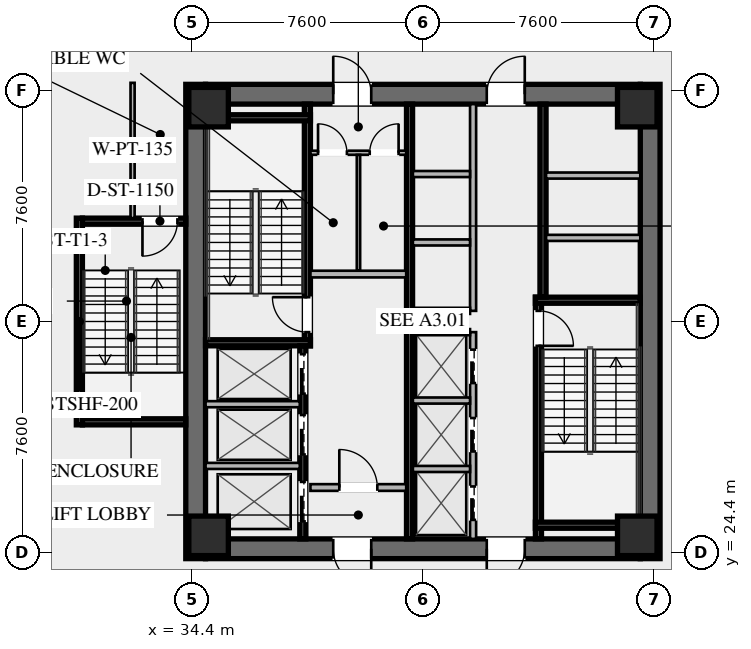
"""IFC4 building model, lengths in metres.
Left out: names, types, materials, properties, quantities, classifications, styles, units other than length and angle.
Written with IfcOpenShell. Run it as: python <this file> out.ifc"""

import sys

from ifc_helpers import new_model, si_unit, direction, frame, frame_2d, origin, origin_2d, place, context, subcontext, project, spatial, rectangle, hollow_rectangle, extrude, element, fill, save


model = new_model("IFC4")
c1 = context("Model", 3, precision=1e-05, world=origin(), true_north=direction((0.0, 1.0)))
c2 = subcontext(c1, "Body", "Model", "MODEL_VIEW")
j1 = project(units=[si_unit("LENGTHUNIT", "METRE"), si_unit("PLANEANGLEUNIT", "RADIAN")], contexts=[c1])
p1 = place(None, origin())
s1 = spatial("IfcSite", under=j1, at=p1, CompositionType="ELEMENT")
p2 = place(p1, origin())
s2 = spatial("IfcBuilding", under=s1, at=p2, CompositionType="ELEMENT")
p3 = place(p2, frame((0.0, 0.0, 5.4)))
s3 = spatial("IfcBuildingStorey", under=s2, at=p3, CompositionType="ELEMENT", Elevation=5.4)
for number, where, z_axis, x_axis in (
    (1, (34.525, 24.2, 0.0), (0.0, 0.0, 1.0), (0.0, 1.0, 0.0)),
    (2, (49.475, 39.8, 0.0), (0.0, 0.0, 1.0), (0.0, -1.0, 0.0)),
):
    element("IfcWall", number, at=place(p3, frame(where, z_axis=z_axis, x_axis=x_axis)), inside=s3, PredefinedType="SHEAR", context=c2, shape_type="SweptSolid", body=[
        extrude(rectangle(XDim=15.6, YDim=0.65, at=frame_2d((7.8, 0.0))), origin(), (0.0, 0.0, 1.0), 4.8),
    ])
p4 = place(p3, frame((49.15, 24.525, 0.0), z_axis=(0.0, 0.0, 1.0), x_axis=(-1.0, 0.0, 0.0)))
e3 = element("IfcWall", 3, at=p4, inside=s3, PredefinedType="SHEAR", context=c2, shape_type="SweptSolid", body=[
    extrude(rectangle(XDim=14.3, YDim=0.65, at=frame_2d((7.15, 0.0))), origin(), (0.0, 0.0, 1.0), 4.8),
])
p5 = place(p4, frame((8.85, 0.0, 0.0)))
e4 = element("IfcOpeningElement", 4, at=p5, cuts=e3, PredefinedType="OPENING", context=c2, shape_type="SweptSolid", body=[
    extrude(rectangle(XDim=1.25, YDim=2.25, at=frame_2d((0.625, 1.125))), frame((0.0, 0.335, 0.0), z_axis=(0.0, -1.0, 0.0), x_axis=(1.0, 0.0, 0.0)), (0.0, 0.0, 1.0), 0.67),
])
p6 = place(p4, frame((3.8, 0.0, 0.0)))
e5 = element("IfcOpeningElement", 5, at=p6, cuts=e3, PredefinedType="OPENING", context=c2, shape_type="SweptSolid", body=[
    extrude(rectangle(XDim=1.25, YDim=2.25, at=frame_2d((0.625, 1.125))), frame((0.0, 0.335, 0.0), z_axis=(0.0, -1.0, 0.0), x_axis=(1.0, 0.0, 0.0)), (0.0, 0.0, 1.0), 0.67),
])
p7 = place(p3, frame((34.85, 39.475, 0.0), z_axis=(0.0, 0.0, 1.0), x_axis=(1.0, 0.0, 0.0)))
e6 = element("IfcWall", 6, at=p7, inside=s3, PredefinedType="SHEAR", context=c2, shape_type="SweptSolid", body=[
    extrude(rectangle(XDim=14.3, YDim=0.65, at=frame_2d((7.15, 0.0))), origin(), (0.0, 0.0, 1.0), 4.8),
])
p8 = place(p7, frame((4.2, 0.0, 0.0)))
e7 = element("IfcOpeningElement", 7, at=p8, cuts=e6, PredefinedType="OPENING", context=c2, shape_type="SweptSolid", body=[
    extrude(rectangle(XDim=1.25, YDim=2.25, at=frame_2d((0.625, 1.125))), frame((0.0, 0.335, 0.0), z_axis=(0.0, -1.0, 0.0), x_axis=(1.0, 0.0, 0.0)), (0.0, 0.0, 1.0), 0.67),
])
p9 = place(p7, frame((9.25, 0.0, 0.0)))
e8 = element("IfcOpeningElement", 8, at=p9, cuts=e6, PredefinedType="OPENING", context=c2, shape_type="SweptSolid", body=[
    extrude(rectangle(XDim=1.25, YDim=2.25, at=frame_2d((0.625, 1.125))), frame((0.0, 0.335, 0.0), z_axis=(0.0, -1.0, 0.0), x_axis=(1.0, 0.0, 0.0)), (0.0, 0.0, 1.0), 0.67),
])
for number, where, z_axis, x_axis in (
    (9, (34.95, 24.95, 0.0), (0.0, 0.0, 1.0), (1.0, 0.0, 0.0)),
    (10, (49.05, 24.95, 0.0), (0.0, 0.0, 1.0), (1.0, 0.0, 0.0)),
    (11, (49.05, 39.05, 0.0), (0.0, 0.0, 1.0), (1.0, 0.0, 0.0)),
    (12, (34.95, 39.05, 0.0), (0.0, 0.0, 1.0), (1.0, 0.0, 0.0)),
):
    element("IfcColumn", number, at=place(p3, frame(where, z_axis=z_axis, x_axis=x_axis)), inside=s3, PredefinedType="COLUMN", context=c2, shape_type="SweptSolid", body=[
        extrude(hollow_rectangle(XDim=1.3, YDim=1.3, WallThickness=0.05, at=origin_2d()), origin(), (0.0, 0.0, 1.0), 4.54),
    ])
p10 = place(p3, frame((38.2, 31.2, 0.0), z_axis=(0.0, 0.0, 1.0), x_axis=(0.0, 1.0, 0.0)))
e13 = element("IfcWall", 13, at=p10, inside=s3, PredefinedType="SHEAR", context=c2, shape_type="SweptSolid", body=[
    extrude(rectangle(XDim=7.95, YDim=0.2, at=frame_2d((3.975, 0.0))), origin(), (0.0, 0.0, 1.0), 4.54),
])
p11 = place(p10, frame((0.45, 0.0, 0.0)))
e14 = element("IfcOpeningElement", 14, at=p11, cuts=e13, PredefinedType="OPENING", context=c2, shape_type="SweptSolid", body=[
    extrude(rectangle(XDim=1.15, YDim=2.2, at=frame_2d((0.575, 1.1))), frame((0.0, 0.11, 0.0), z_axis=(0.0, -1.0, 0.0), x_axis=(1.0, 0.0, 0.0)), (0.0, 0.0, 1.0), 0.22),
])
for number, where, z_axis, x_axis in (
    (15, (34.85, 31.3, 0.0), (0.0, 0.0, 1.0), (1.0, 0.0, 0.0)),
    (16, (34.85, 38.7, 0.0), (0.0, 0.0, 1.0), (1.0, 0.0, 0.0)),
):
    element("IfcWall", number, at=place(p3, frame(where, z_axis=z_axis, x_axis=x_axis)), inside=s3, PredefinedType="SHEAR", context=c2, shape_type="SweptSolid", body=[
        extrude(rectangle(XDim=3.45, YDim=0.2, at=frame_2d((1.725, 0.0))), origin(), (0.0, 0.0, 1.0), 4.54),
    ])
p12 = place(p3, frame((45.8, 32.8, 0.0), z_axis=(0.0, 0.0, 1.0), x_axis=(0.0, -1.0, 0.0)))
e17 = element("IfcWall", 17, at=p12, inside=s3, PredefinedType="SHEAR", context=c2, shape_type="SweptSolid", body=[
    extrude(rectangle(XDim=7.95, YDim=0.2, at=frame_2d((3.975, 0.0))), origin(), (0.0, 0.0, 1.0), 4.54),
])
p13 = place(p12, frame((0.45, 0.0, 0.0)))
e18 = element("IfcOpeningElement", 18, at=p13, cuts=e17, PredefinedType="OPENING", context=c2, shape_type="SweptSolid", body=[
    extrude(rectangle(XDim=1.15, YDim=2.2, at=frame_2d((0.575, 1.1))), frame((0.0, 0.11, 0.0), z_axis=(0.0, -1.0, 0.0), x_axis=(1.0, 0.0, 0.0)), (0.0, 0.0, 1.0), 0.22),
])
for number, where, z_axis, x_axis in (
    (19, (45.7, 32.7, 0.0), (0.0, 0.0, 1.0), (1.0, 0.0, 0.0)),
    (20, (45.7, 25.3, 0.0), (0.0, 0.0, 1.0), (1.0, 0.0, 0.0)),
):
    element("IfcWall", number, at=place(p3, frame(where, z_axis=z_axis, x_axis=x_axis)), inside=s3, PredefinedType="SHEAR", context=c2, shape_type="SweptSolid", body=[
        extrude(rectangle(XDim=3.45, YDim=0.2, at=frame_2d((1.725, 0.0))), origin(), (0.0, 0.0, 1.0), 4.54),
    ])
p14 = place(p3, frame((41.56, 24.85, 0.0), z_axis=(0.0, 0.0, 1.0), x_axis=(0.0, 1.0, 0.0)))
e21 = element("IfcWall", 21, at=p14, inside=s3, PredefinedType="SHEAR", context=c2, shape_type="SweptSolid", body=[
    extrude(rectangle(XDim=14.3, YDim=0.2, at=frame_2d((7.15, 0.0))), origin(), (0.0, 0.0, 1.0), 4.54),
])
p15 = place(p3, frame((38.3, 33.56, 0.0), z_axis=(0.0, 0.0, 1.0), x_axis=(1.0, 0.0, 0.0)))
e22 = element("IfcWall", 22, at=p15, inside=s3, PredefinedType="SOLIDWALL", context=c2, shape_type="SweptSolid", body=[
    extrude(rectangle(XDim=3.15, YDim=0.22, at=frame_2d((1.575, 0.0))), origin(), (0.0, 0.0, 1.0), 3.583),
])
p16 = place(p3, frame((38.3, 26.54, 0.0), z_axis=(0.0, 0.0, 1.0), x_axis=(1.0, 0.0, 0.0)))
e23 = element("IfcWall", 23, at=p16, inside=s3, PredefinedType="SOLIDWALL", context=c2, shape_type="SweptSolid", body=[
    extrude(rectangle(XDim=3.15, YDim=0.22, at=frame_2d((1.575, 0.0))), origin(), (0.0, 0.0, 1.0), 3.583),
])
p17 = place(p16, frame((0.95, 0.0, 0.0)))
e24 = element("IfcOpeningElement", 24, at=p17, cuts=e23, PredefinedType="OPENING", context=c2, shape_type="SweptSolid", body=[
    extrude(rectangle(XDim=1.25, YDim=2.25, at=frame_2d((0.625, 1.125))), frame((0.0, 0.12, 0.0), z_axis=(0.0, -1.0, 0.0), x_axis=(1.0, 0.0, 0.0)), (0.0, 0.0, 1.0), 0.24),
])
p18 = place(p3, frame((38.05, 24.85, 0.0), z_axis=(0.0, 0.0, 1.0), x_axis=(0.0, 1.0, 0.0)))
e25 = element("IfcWall", 25, at=p18, inside=s3, PredefinedType="SHEAR", context=c2, shape_type="SweptSolid", body=[
    extrude(rectangle(XDim=6.35, YDim=0.2, at=frame_2d((3.175, 0.0))), origin(), (0.0, 0.0, 1.0), 4.54),
])
p19 = place(p18, frame((4.775, 0.0, 0.0)))
e26 = element("IfcOpeningElement", 26, at=p19, cuts=e25, PredefinedType="OPENING", context=c2, shape_type="SweptSolid", body=[
    extrude(rectangle(XDim=1.3, YDim=2.25, at=frame_2d((0.65, 1.125))), frame((0.0, 0.11, 0.0), z_axis=(0.0, -1.0, 0.0), x_axis=(1.0, 0.0, 0.0)), (0.0, 0.0, 1.0), 0.22),
])
p20 = place(p18, frame((2.775, 0.0, 0.0)))
e27 = element("IfcOpeningElement", 27, at=p20, cuts=e25, PredefinedType="OPENING", context=c2, shape_type="SweptSolid", body=[
    extrude(rectangle(XDim=1.3, YDim=2.25, at=frame_2d((0.65, 1.125))), frame((0.0, 0.11, 0.0), z_axis=(0.0, -1.0, 0.0), x_axis=(1.0, 0.0, 0.0)), (0.0, 0.0, 1.0), 0.22),
])
p21 = place(p18, frame((0.575, 0.0, 0.0)))
e28 = element("IfcOpeningElement", 28, at=p21, cuts=e25, PredefinedType="OPENING", context=c2, shape_type="SweptSolid", body=[
    extrude(rectangle(XDim=1.3, YDim=2.25, at=frame_2d((0.65, 1.125))), frame((0.0, 0.11, 0.0), z_axis=(0.0, -1.0, 0.0), x_axis=(1.0, 0.0, 0.0)), (0.0, 0.0, 1.0), 0.22),
])
for number, where, z_axis, x_axis in (
    (29, (34.85, 27.25, 0.0), (0.0, 0.0, 1.0), (1.0, 0.0, 0.0)),
    (30, (34.85, 29.28, 0.0), (0.0, 0.0, 1.0), (1.0, 0.0, 0.0)),
):
    element("IfcWall", number, at=place(p3, frame(where, z_axis=z_axis, x_axis=x_axis)), inside=s3, PredefinedType="SOLIDWALL", context=c2, shape_type="SweptSolid", body=[
        extrude(rectangle(XDim=3.1, YDim=0.2, at=frame_2d((1.55, 0.0))), origin(), (0.0, 0.0, 1.0), 4.54),
    ])
p22 = place(p3, frame((45.95, 39.15, 0.0), z_axis=(0.0, 0.0, 1.0), x_axis=(0.0, -1.0, 0.0)))
e31 = element("IfcWall", 31, at=p22, inside=s3, PredefinedType="SHEAR", context=c2, shape_type="SweptSolid", body=[
    extrude(rectangle(XDim=6.35, YDim=0.2, at=frame_2d((3.175, 0.0))), origin(), (0.0, 0.0, 1.0), 4.54),
])
for number, where, z_axis, x_axis in (
    (32, (46.05, 34.75, 0.0), (0.0, 0.0, 1.0), (1.0, 0.0, 0.0)),
    (33, (46.05, 36.8, 0.0), (0.0, 0.0, 1.0), (1.0, 0.0, 0.0)),
):
    element("IfcWall", number, at=place(p3, frame(where, z_axis=z_axis, x_axis=x_axis)), inside=s3, PredefinedType="SOLIDWALL", context=c2, shape_type="SweptSolid", body=[
        extrude(rectangle(XDim=3.1, YDim=0.2, at=frame_2d((1.55, 0.0))), origin(), (0.0, 0.0, 1.0), 4.54),
    ])
p23 = place(p3, frame((38.3, 37.55, 0.0), z_axis=(0.0, 0.0, 1.0), x_axis=(1.0, 0.0, 0.0)))
e34 = element("IfcWall", 34, at=p23, inside=s3, PredefinedType="PARTITIONING", context=c2, shape_type="SweptSolid", body=[
    extrude(rectangle(XDim=3.15, YDim=0.135, at=frame_2d((1.575, 0.0))), origin(), (0.0, 0.0, 1.0), 3.583),
])
p24 = place(p23, frame((0.25, 0.0, 0.0)))
e35 = element("IfcOpeningElement", 35, at=p24, cuts=e34, PredefinedType="OPENING", context=c2, shape_type="SweptSolid", body=[
    extrude(rectangle(XDim=0.95, YDim=2.05, at=frame_2d((0.475, 1.025))), frame((0.0, 0.077, 0.0), z_axis=(0.0, -1.0, 0.0), x_axis=(1.0, 0.0, 0.0)), (0.0, 0.0, 1.0), 0.155),
])
p25 = place(p23, frame((1.95, 0.0, 0.0)))
e36 = element("IfcOpeningElement", 36, at=p25, cuts=e34, PredefinedType="OPENING", context=c2, shape_type="SweptSolid", body=[
    extrude(rectangle(XDim=0.95, YDim=2.05, at=frame_2d((0.475, 1.025))), frame((0.0, 0.077, 0.0), z_axis=(0.0, -1.0, 0.0), x_axis=(1.0, 0.0, 0.0)), (0.0, 0.0, 1.0), 0.155),
])
p26 = place(p3, frame((39.88, 33.68, 0.0), z_axis=(0.0, 0.0, 1.0), x_axis=(0.0, 1.0, 0.0)))
e37 = element("IfcWall", 37, at=p26, inside=s3, PredefinedType="PARTITIONING", context=c2, shape_type="SweptSolid", body=[
    extrude(rectangle(XDim=3.8, YDim=0.11, at=frame_2d((1.9, 0.0))), origin(), (0.0, 0.0, 1.0), 3.583),
])
p27 = place(p3, frame((43.65, 24.85, 0.0), z_axis=(0.0, 0.0, 1.0), x_axis=(0.0, 1.0, 0.0)))
e38 = element("IfcWall", 38, at=p27, inside=s3, PredefinedType="SOLIDWALL", context=c2, shape_type="SweptSolid", body=[
    extrude(rectangle(XDim=6.8, YDim=0.2, at=frame_2d((3.4, 0.0))), origin(), (0.0, 0.0, 1.0), 4.54),
])
p28 = place(p27, frame((0.625, 0.0, 0.0)))
e39 = element("IfcOpeningElement", 39, at=p28, cuts=e38, PredefinedType="OPENING", context=c2, shape_type="SweptSolid", body=[
    extrude(rectangle(XDim=1.1, YDim=2.2, at=frame_2d((0.55, 1.1))), frame((0.0, 0.11, 0.0), z_axis=(0.0, -1.0, 0.0), x_axis=(1.0, 0.0, 0.0)), (0.0, 0.0, 1.0), 0.22),
])
p29 = place(p27, frame((2.875, 0.0, 0.0)))
e40 = element("IfcOpeningElement", 40, at=p29, cuts=e38, PredefinedType="OPENING", context=c2, shape_type="SweptSolid", body=[
    extrude(rectangle(XDim=1.1, YDim=2.2, at=frame_2d((0.55, 1.1))), frame((0.0, 0.11, 0.0), z_axis=(0.0, -1.0, 0.0), x_axis=(1.0, 0.0, 0.0)), (0.0, 0.0, 1.0), 0.22),
])
p30 = place(p27, frame((5.125, 0.0, 0.0)))
e41 = element("IfcOpeningElement", 41, at=p30, cuts=e38, PredefinedType="OPENING", context=c2, shape_type="SweptSolid", body=[
    extrude(rectangle(XDim=1.1, YDim=2.2, at=frame_2d((0.55, 1.1))), frame((0.0, 0.11, 0.0), z_axis=(0.0, -1.0, 0.0), x_axis=(1.0, 0.0, 0.0)), (0.0, 0.0, 1.0), 0.22),
])
for number, where, z_axis, x_axis in (
    (42, (41.67, 27.15, 0.0), (0.0, 0.0, 1.0), (1.0, 0.0, 0.0)),
    (43, (41.67, 29.4, 0.0), (0.0, 0.0, 1.0), (1.0, 0.0, 0.0)),
    (44, (41.67, 31.65, 0.0), (0.0, 0.0, 1.0), (1.0, 0.0, 0.0)),
):
    element("IfcWall", number, at=place(p3, frame(where, z_axis=z_axis, x_axis=x_axis)), inside=s3, PredefinedType="SOLIDWALL", context=c2, shape_type="SweptSolid", body=[
        extrude(rectangle(XDim=1.88, YDim=0.2, at=frame_2d((0.94, 0.0))), origin(), (0.0, 0.0, 1.0), 4.54),
    ])
p31 = place(p3, frame((43.65, 32.35, 0.0), z_axis=(0.0, 0.0, 1.0), x_axis=(0.0, 1.0, 0.0)))
e45 = element("IfcWall", 45, at=p31, inside=s3, PredefinedType="SOLIDWALL", context=c2, shape_type="SweptSolid", body=[
    extrude(rectangle(XDim=6.8, YDim=0.2, at=frame_2d((3.4, 0.0))), origin(), (0.0, 0.0, 1.0), 4.54),
])
for number, where, z_axis, x_axis in (
    (46, (41.67, 32.35, 0.0), (0.0, 0.0, 1.0), (1.0, 0.0, 0.0)),
    (47, (41.67, 34.6, 0.0), (0.0, 0.0, 1.0), (1.0, 0.0, 0.0)),
    (48, (41.67, 36.85, 0.0), (0.0, 0.0, 1.0), (1.0, 0.0, 0.0)),
):
    element("IfcWall", number, at=place(p3, frame(where, z_axis=z_axis, x_axis=x_axis)), inside=s3, PredefinedType="SOLIDWALL", context=c2, shape_type="SweptSolid", body=[
        extrude(rectangle(XDim=1.88, YDim=0.2, at=frame_2d((0.94, 0.0))), origin(), (0.0, 0.0, 1.0), 4.54),
    ])
p32 = place(p3, frame((30.7, 28.6, 0.0), z_axis=(0.0, 0.0, 1.0), x_axis=(0.0, 1.0, 0.0)))
e49 = element("IfcWall", 49, at=p32, inside=s3, PredefinedType="SHEAR", context=c2, shape_type="SweptSolid", body=[
    extrude(rectangle(XDim=6.8, YDim=0.2, at=frame_2d((3.4, 0.0))), origin(), (0.0, 0.0, 1.0), 4.54),
])
p33 = place(p3, frame((34.2, 35.3, 0.0), z_axis=(0.0, 0.0, 1.0), x_axis=(-1.0, 0.0, 0.0)))
e50 = element("IfcWall", 50, at=p33, inside=s3, PredefinedType="SHEAR", context=c2, shape_type="SweptSolid", body=[
    extrude(rectangle(XDim=3.4, YDim=0.2, at=frame_2d((1.7, 0.0))), origin(), (0.0, 0.0, 1.0), 4.54),
])
p34 = place(p33, frame((0.275, 0.0, 0.0)))
e51 = element("IfcOpeningElement", 51, at=p34, cuts=e50, PredefinedType="OPENING", context=c2, shape_type="SweptSolid", body=[
    extrude(rectangle(XDim=1.15, YDim=2.2, at=frame_2d((0.575, 1.1))), frame((0.0, 0.11, 0.0), z_axis=(0.0, -1.0, 0.0), x_axis=(1.0, 0.0, 0.0)), (0.0, 0.0, 1.0), 0.22),
])
p35 = place(p3, frame((30.8, 28.7, 0.0), z_axis=(0.0, 0.0, 1.0), x_axis=(1.0, 0.0, 0.0)))
e52 = element("IfcWall", 52, at=p35, inside=s3, PredefinedType="SHEAR", context=c2, shape_type="SweptSolid", body=[
    extrude(rectangle(XDim=3.4, YDim=0.2, at=frame_2d((1.7, 0.0))), origin(), (0.0, 0.0, 1.0), 4.54),
])
p36 = place(p3, frame((32.45, 35.4, 0.0), z_axis=(0.0, 0.0, 1.0), x_axis=(0.0, 1.0, 0.0)))
e53 = element("IfcWall", 53, at=p36, inside=s3, PredefinedType="PARTITIONING", context=c2, shape_type="SweptSolid", body=[
    extrude(rectangle(XDim=4.45, YDim=0.135, at=frame_2d((2.225, 0.0))), origin(), (0.0, 0.0, 1.0), 3.583),
])
p37 = place(p8, origin())
e54 = element("IfcDoor", 54, at=p37, inside=s3, OperationType="SINGLE_SWING_LEFT", PredefinedType="DOOR", context=c2, shape_type="SweptSolid", body=[
    extrude(rectangle(XDim=1.25, YDim=2.25, at=frame_2d((0.625, 1.125))), frame((0.0, 0.025, 0.0), z_axis=(0.0, -1.0, 0.0), x_axis=(1.0, 0.0, 0.0)), (0.0, 0.0, 1.0), 0.05),
])
fill(e7, e54)
p38 = place(p9, origin())
e55 = element("IfcDoor", 55, at=p38, inside=s3, OperationType="SINGLE_SWING_RIGHT", PredefinedType="DOOR", context=c2, shape_type="SweptSolid", body=[
    extrude(rectangle(XDim=1.25, YDim=2.25, at=frame_2d((0.625, 1.125))), frame((0.0, 0.025, 0.0), z_axis=(0.0, -1.0, 0.0), x_axis=(1.0, 0.0, 0.0)), (0.0, 0.0, 1.0), 0.05),
])
fill(e8, e55)
p39 = place(p5, origin())
e56 = element("IfcDoor", 56, at=p39, inside=s3, OperationType="SINGLE_SWING_LEFT", PredefinedType="DOOR", context=c2, shape_type="SweptSolid", body=[
    extrude(rectangle(XDim=1.25, YDim=2.25, at=frame_2d((0.625, 1.125))), frame((0.0, 0.025, 0.0), z_axis=(0.0, -1.0, 0.0), x_axis=(1.0, 0.0, 0.0)), (0.0, 0.0, 1.0), 0.05),
])
fill(e4, e56)
p40 = place(p6, origin())
e57 = element("IfcDoor", 57, at=p40, inside=s3, OperationType="SINGLE_SWING_RIGHT", PredefinedType="DOOR", context=c2, shape_type="SweptSolid", body=[
    extrude(rectangle(XDim=1.25, YDim=2.25, at=frame_2d((0.625, 1.125))), frame((0.0, 0.025, 0.0), z_axis=(0.0, -1.0, 0.0), x_axis=(1.0, 0.0, 0.0)), (0.0, 0.0, 1.0), 0.05),
])
fill(e5, e57)
p41 = place(p11, origin())
e58 = element("IfcDoor", 58, at=p41, inside=s3, OperationType="SINGLE_SWING_RIGHT", PredefinedType="DOOR", context=c2, shape_type="SweptSolid", body=[
    extrude(rectangle(XDim=1.15, YDim=2.2, at=frame_2d((0.575, 1.1))), frame((0.0, 0.025, 0.0), z_axis=(0.0, -1.0, 0.0), x_axis=(1.0, 0.0, 0.0)), (0.0, 0.0, 1.0), 0.05),
])
fill(e14, e58)
p42 = place(p13, origin())
e59 = element("IfcDoor", 59, at=p42, inside=s3, OperationType="SINGLE_SWING_RIGHT", PredefinedType="DOOR", context=c2, shape_type="SweptSolid", body=[
    extrude(rectangle(XDim=1.15, YDim=2.2, at=frame_2d((0.575, 1.1))), frame((0.0, 0.025, 0.0), z_axis=(0.0, -1.0, 0.0), x_axis=(1.0, 0.0, 0.0)), (0.0, 0.0, 1.0), 0.05),
])
fill(e18, e59)
p43 = place(p17, origin())
e60 = element("IfcDoor", 60, at=p43, inside=s3, OperationType="SINGLE_SWING_LEFT", PredefinedType="DOOR", context=c2, shape_type="SweptSolid", body=[
    extrude(rectangle(XDim=1.25, YDim=2.25, at=frame_2d((0.625, 1.125))), frame((0.0, 0.025, 0.0), z_axis=(0.0, -1.0, 0.0), x_axis=(1.0, 0.0, 0.0)), (0.0, 0.0, 1.0), 0.05),
])
fill(e24, e60)
p44 = place(p24, origin())
e61 = element("IfcDoor", 61, at=p44, inside=s3, OperationType="SINGLE_SWING_LEFT", PredefinedType="DOOR", context=c2, shape_type="SweptSolid", body=[
    extrude(rectangle(XDim=0.95, YDim=2.05, at=frame_2d((0.475, 1.025))), frame((0.0, 0.025, 0.0), z_axis=(0.0, -1.0, 0.0), x_axis=(1.0, 0.0, 0.0)), (0.0, 0.0, 1.0), 0.05),
])
fill(e35, e61)
p45 = place(p25, origin())
e62 = element("IfcDoor", 62, at=p45, inside=s3, OperationType="SINGLE_SWING_RIGHT", PredefinedType="DOOR", context=c2, shape_type="SweptSolid", body=[
    extrude(rectangle(XDim=0.95, YDim=2.05, at=frame_2d((0.475, 1.025))), frame((0.0, 0.025, 0.0), z_axis=(0.0, -1.0, 0.0), x_axis=(1.0, 0.0, 0.0)), (0.0, 0.0, 1.0), 0.05),
])
fill(e36, e62)
p46 = place(p34, origin())
e63 = element("IfcDoor", 63, at=p46, inside=s3, OperationType="SINGLE_SWING_RIGHT", PredefinedType="DOOR", context=c2, shape_type="SweptSolid", body=[
    extrude(rectangle(XDim=1.15, YDim=2.2, at=frame_2d((0.575, 1.1))), frame((0.0, 0.025, 0.0), z_axis=(0.0, -1.0, 0.0), x_axis=(1.0, 0.0, 0.0)), (0.0, 0.0, 1.0), 0.05),
])
fill(e51, e63)
p47 = place(p19, origin())
e64 = element("IfcDoor", 64, at=p47, inside=s3, OperationType="SLIDING_TO_LEFT", PredefinedType="DOOR", context=c2, shape_type="SweptSolid", body=[
    extrude(rectangle(XDim=1.3, YDim=2.25, at=frame_2d((0.65, 1.125))), frame((0.0, 0.025, 0.0), z_axis=(0.0, -1.0, 0.0), x_axis=(1.0, 0.0, 0.0)), (0.0, 0.0, 1.0), 0.05),
])
fill(e26, e64)
p48 = place(p20, origin())
e65 = element("IfcDoor", 65, at=p48, inside=s3, OperationType="SLIDING_TO_LEFT", PredefinedType="DOOR", context=c2, shape_type="SweptSolid", body=[
    extrude(rectangle(XDim=1.3, YDim=2.25, at=frame_2d((0.65, 1.125))), frame((0.0, 0.025, 0.0), z_axis=(0.0, -1.0, 0.0), x_axis=(1.0, 0.0, 0.0)), (0.0, 0.0, 1.0), 0.05),
])
fill(e27, e65)
p49 = place(p21, origin())
e66 = element("IfcDoor", 66, at=p49, inside=s3, OperationType="SLIDING_TO_LEFT", PredefinedType="DOOR", context=c2, shape_type="SweptSolid", body=[
    extrude(rectangle(XDim=1.3, YDim=2.25, at=frame_2d((0.65, 1.125))), frame((0.0, 0.025, 0.0), z_axis=(0.0, -1.0, 0.0), x_axis=(1.0, 0.0, 0.0)), (0.0, 0.0, 1.0), 0.05),
])
fill(e28, e66)
p50 = place(p28, origin())
e67 = element("IfcDoor", 67, at=p50, inside=s3, OperationType="SLIDING_TO_LEFT", PredefinedType="DOOR", context=c2, shape_type="SweptSolid", body=[
    extrude(rectangle(XDim=1.1, YDim=2.2, at=frame_2d((0.55, 1.1))), frame((0.0, 0.025, 0.0), z_axis=(0.0, -1.0, 0.0), x_axis=(1.0, 0.0, 0.0)), (0.0, 0.0, 1.0), 0.05),
])
fill(e39, e67)
p51 = place(p29, origin())
e68 = element("IfcDoor", 68, at=p51, inside=s3, OperationType="SLIDING_TO_LEFT", PredefinedType="DOOR", context=c2, shape_type="SweptSolid", body=[
    extrude(rectangle(XDim=1.1, YDim=2.2, at=frame_2d((0.55, 1.1))), frame((0.0, 0.025, 0.0), z_axis=(0.0, -1.0, 0.0), x_axis=(1.0, 0.0, 0.0)), (0.0, 0.0, 1.0), 0.05),
])
fill(e40, e68)
p52 = place(p30, origin())
e69 = element("IfcDoor", 69, at=p52, inside=s3, OperationType="SLIDING_TO_LEFT", PredefinedType="DOOR", context=c2, shape_type="SweptSolid", body=[
    extrude(rectangle(XDim=1.1, YDim=2.2, at=frame_2d((0.55, 1.1))), frame((0.0, 0.025, 0.0), z_axis=(0.0, -1.0, 0.0), x_axis=(1.0, 0.0, 0.0)), (0.0, 0.0, 1.0), 0.05),
])
fill(e41, e69)
save(model, sys.argv[1])
